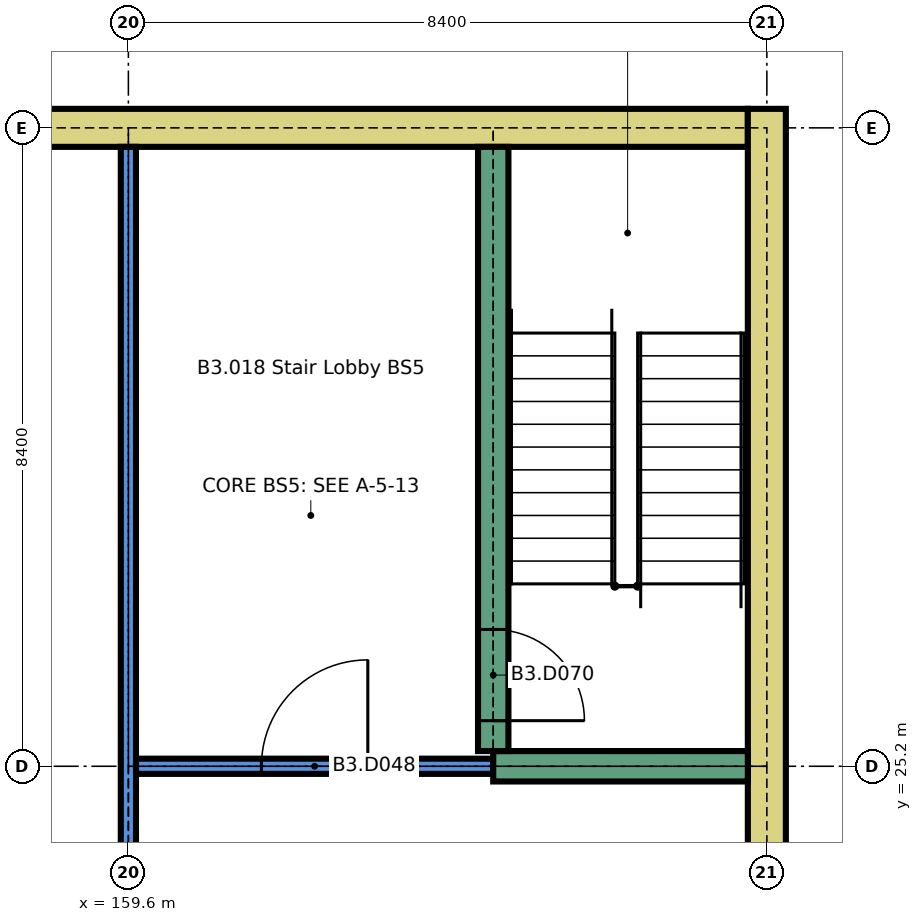
"""IFC4 building model, lengths in metres.
Left out: names, types, materials, properties, quantities, classifications, styles, units other than length and angle.
Written with IfcOpenShell. Run it as: python <this file> out.ifc"""

import sys

from ifc_helpers import new_model, si_unit, direction, frame, frame_2d, origin, place, context, subcontext, project, spatial, rectangle, extrude, element, fill, save


model = new_model("IFC4")
c1 = context("Model", 3, precision=1e-05, world=origin(), true_north=direction((0.0, 1.0)))
c2 = subcontext(c1, "Body", "Model", "MODEL_VIEW")
j1 = project(units=[si_unit("LENGTHUNIT", "METRE"), si_unit("PLANEANGLEUNIT", "RADIAN")], contexts=[c1])
p1 = place(None, origin())
s1 = spatial("IfcSite", under=j1, at=p1, CompositionType="ELEMENT")
p2 = place(p1, origin())
s2 = spatial("IfcBuilding", under=s1, at=p2, CompositionType="ELEMENT")
p3 = place(p2, frame((0.0, 0.0, -11.4)))
s3 = spatial("IfcBuildingStorey", under=s2, at=p3, CompositionType="ELEMENT", Elevation=-11.4)
p4 = place(p3, frame((151.65, 33.6, 0.0), z_axis=(0.0, 0.0, 1.0), x_axis=(1.0, 0.0, 0.0)))
e1 = element("IfcWall", 1, at=p4, inside=s3, PredefinedType="SOLIDWALL", context=c2, shape_type="SweptSolid", body=[
    extrude(rectangle(XDim=16.1, YDim=0.5, at=frame_2d((8.05, 0.0))), origin(), (0.0, 0.0, 1.0), 3.2),
])
p5 = place(p3, frame((168.0, 17.25, 0.0), z_axis=(0.0, 0.0, 1.0), x_axis=(0.0, 1.0, 0.0)))
e2 = element("IfcWall", 2, at=p5, inside=s3, PredefinedType="SOLIDWALL", context=c2, shape_type="SweptSolid", body=[
    extrude(rectangle(XDim=16.6, YDim=0.5, at=frame_2d((8.3, 0.0))), origin(), (0.0, 0.0, 1.0), 3.2),
])
p6 = place(p3, frame((159.7, 25.2, 0.0), z_axis=(0.0, 0.0, 1.0), x_axis=(1.0, 0.0, 0.0)))
e3 = element("IfcWall", 3, at=p6, inside=s3, PredefinedType="PARTITIONING", context=c2, shape_type="SweptSolid", body=[
    extrude(rectangle(XDim=4.7, YDim=0.2, at=frame_2d((2.35, 0.0))), origin(), (0.0, 0.0, 1.0), 3.2),
])
p7 = place(p6, frame((1.65, 0.0, 0.0)))
e4 = element("IfcOpeningElement", 4, at=p7, cuts=e3, PredefinedType="OPENING", context=c2, shape_type="SweptSolid", body=[
    extrude(rectangle(XDim=1.4, YDim=2.1, at=frame_2d((0.7, 1.05))), frame((0.0, 0.11, 0.0), z_axis=(0.0, -1.0, 0.0), x_axis=(1.0, 0.0, 0.0)), (0.0, 0.0, 1.0), 0.22),
])
p8 = place(p3, frame((164.4, 25.2, 0.0), z_axis=(0.0, 0.0, 1.0), x_axis=(1.0, 0.0, 0.0)))
e5 = element("IfcWall", 5, at=p8, inside=s3, PredefinedType="SHEAR", context=c2, shape_type="SweptSolid", body=[
    extrude(rectangle(XDim=3.35, YDim=0.4, at=frame_2d((1.675, 0.0))), origin(), (0.0, 0.0, 1.0), 3.2),
])
p9 = place(p3, frame((159.6, 21.7, 0.0), z_axis=(0.0, 0.0, 1.0), x_axis=(0.0, 1.0, 0.0)))
e6 = element("IfcWall", 6, at=p9, inside=s3, PredefinedType="PARTITIONING", context=c2, shape_type="SweptSolid", body=[
    extrude(rectangle(XDim=11.65, YDim=0.2, at=frame_2d((5.825, 0.0))), origin(), (0.0, 0.0, 1.0), 3.2),
])
p10 = place(p3, frame((164.4, 25.4, 0.0), z_axis=(0.0, 0.0, 1.0), x_axis=(0.0, 1.0, 0.0)))
e7 = element("IfcWall", 7, at=p10, inside=s3, PredefinedType="SHEAR", context=c2, shape_type="SweptSolid", body=[
    extrude(rectangle(XDim=7.95, YDim=0.4, at=frame_2d((3.975, 0.0))), origin(), (0.0, 0.0, 1.0), 3.2),
])
p11 = place(p10, frame((0.4, 0.0, 0.0)))
e8 = element("IfcOpeningElement", 8, at=p11, cuts=e7, PredefinedType="OPENING", context=c2, shape_type="SweptSolid", body=[
    extrude(rectangle(XDim=1.2, YDim=2.1, at=frame_2d((0.6, 1.05))), frame((0.0, 0.21, 0.0), z_axis=(0.0, -1.0, 0.0), x_axis=(1.0, 0.0, 0.0)), (0.0, 0.0, 1.0), 0.42),
])
p12 = place(p7, origin())
e9 = element("IfcDoor", 9, at=p12, inside=s3, OperationType="SINGLE_SWING_LEFT", PredefinedType="DOOR", context=c2, shape_type="SweptSolid", body=[
    extrude(rectangle(XDim=1.4, YDim=2.1, at=frame_2d((0.7, 1.05))), frame((0.0, 0.03, 0.0), z_axis=(0.0, -1.0, 0.0), x_axis=(1.0, 0.0, 0.0)), (0.0, 0.0, 1.0), 0.06),
])
fill(e4, e9)
p13 = place(p11, origin())
e10 = element("IfcDoor", 10, at=p13, inside=s3, OperationType="SINGLE_SWING_LEFT", PredefinedType="DOOR", context=c2, shape_type="SweptSolid", body=[
    extrude(rectangle(XDim=1.2, YDim=2.1, at=frame_2d((0.6, 1.05))), frame((0.0, 0.025, 0.0), z_axis=(0.0, -1.0, 0.0), x_axis=(1.0, 0.0, 0.0)), (0.0, 0.0, 1.0), 0.05),
])
fill(e8, e10)
save(model, sys.argv[1])
